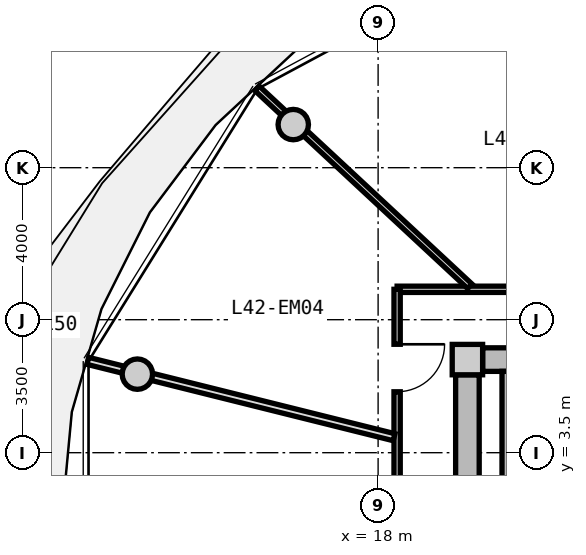
"""IFC4 building model, lengths in metres.
Left out: names, types, materials, properties, quantities, classifications, styles, units other than length and angle.
Written with IfcOpenShell. Run it as: python <this file> out.ifc"""

import sys

from ifc_helpers import new_model, si_unit, direction, frame, frame_2d, origin, origin_2d, place, context, subcontext, project, spatial, rectangle, circle, extrude, source, transform, mapped, element, fill, save


model = new_model("IFC4")
c1 = context("Model", 3, precision=1e-05, world=origin(), true_north=direction((0.0, 1.0)))
c2 = subcontext(c1, "Body", "Model", "MODEL_VIEW")
j1 = project(units=[si_unit("LENGTHUNIT", "METRE"), si_unit("PLANEANGLEUNIT", "RADIAN")], contexts=[c1])
p1 = place(None, origin())
s1 = spatial("IfcSite", under=j1, at=p1, CompositionType="ELEMENT")
p2 = place(p1, origin())
s2 = spatial("IfcBuilding", under=s1, at=p2, CompositionType="ELEMENT")
p3 = place(p2, frame((0.0, 0.0, 137.35)))
s3 = spatial("IfcBuildingStorey", under=s2, at=p3, CompositionType="ELEMENT", Elevation=137.35)
m1 = source(origin(), c2, "Body", "SweptSolid", [
    extrude(rectangle(XDim=0.8, YDim=0.8, at=origin_2d()), origin(), (0.0, 0.0, 1.0), 3.05),
])
p4 = place(p3, frame((20.35, 5.95, 0.0), z_axis=(0.0, 0.0, 1.0), x_axis=(1.0, 0.0, 0.0)))
e1 = element("IfcColumn", 1, at=p4, inside=s3, PredefinedType="COLUMN", context=c2, shape_type="MappedRepresentation", body=[
    mapped(m1, transform((0.0, 0.0, 0.0), x_axis=(1.0, 0.0, 0.0), y_axis=(0.0, 1.0, 0.0), z_axis=(0.0, 0.0, 1.0), scale=1.0)),
])
m2 = source(origin(), c2, "Body", "SweptSolid", [
    extrude(rectangle(XDim=14.5, YDim=0.62, at=frame_2d((7.25, 0.0))), origin(), (0.0, 0.0, 1.0), 2.81),
])
p5 = place(p3, frame((20.75, 5.95, 0.0), z_axis=(0.0, 0.0, 1.0), x_axis=(1.0, 0.0, 0.0)))
e2 = element("IfcWall", 2, at=p5, inside=s3, PredefinedType="SHEAR", context=c2, shape_type="MappedRepresentation", body=[
    mapped(m2, transform((0.0, 0.0, 0.0), x_axis=(1.0, 0.0, 0.0), y_axis=(0.0, 1.0, 0.0), z_axis=(0.0, 0.0, 1.0), scale=1.0)),
])
m3 = source(origin(), c2, "Body", "SweptSolid", [
    extrude(rectangle(XDim=11.1, YDim=0.62, at=frame_2d((5.55, 0.0))), origin(), (0.0, 0.0, 1.0), 2.81),
])
p6 = place(p3, frame((20.35, -5.55, 0.0), z_axis=(0.0, 0.0, 1.0), x_axis=(0.0, 1.0, 0.0)))
e3 = element("IfcWall", 3, at=p6, inside=s3, PredefinedType="SHEAR", context=c2, shape_type="MappedRepresentation", body=[
    mapped(m3, transform((0.0, 0.0, 0.0), x_axis=(1.0, 0.0, 0.0), y_axis=(0.0, 1.0, 0.0), z_axis=(0.0, 0.0, 1.0), scale=1.0)),
])
p7 = place(p6, frame((3.8, 0.0, 0.0)))
e4 = element("IfcOpeningElement", 4, at=p7, cuts=e3, PredefinedType="OPENING", context=c2, shape_type="SweptSolid", body=[
    extrude(rectangle(XDim=1.2, YDim=2.15, at=frame_2d((0.6, 1.075))), frame((0.0, 0.32, 0.0), z_axis=(0.0, -1.0, 0.0), x_axis=(1.0, 0.0, 0.0)), (0.0, 0.0, 1.0), 0.64),
])
m4 = source(origin(), c2, "Body", "SweptSolid", [
    extrude(circle(Radius=0.4, at=origin_2d()), origin(), (0.0, 0.0, 1.0), 3.05),
])
for number, where, z_axis, x_axis in (
    (5, (15.767, 12.135, 0.0), (0.0, 0.0, 1.0), (1.0, 0.0, 0.0)),
    (6, (11.665, 5.567, 0.0), (0.0, 0.0, 1.0), (1.0, 0.0, 0.0)),
):
    element("IfcColumn", number, at=place(p3, frame(where, z_axis=z_axis, x_axis=x_axis)), inside=s3, PredefinedType="COLUMN", context=c2, shape_type="MappedRepresentation", body=[
        mapped(m4, transform((0.0, 0.0, 0.0), x_axis=(1.0, 0.0, 0.0), y_axis=(0.0, 1.0, 0.0), z_axis=(0.0, 0.0, 1.0), scale=1.0)),
    ])
m5 = source(origin(), c2, "Body", "SweptSolid", [
    extrude(rectangle(XDim=3.19, YDim=0.24, at=frame_2d((1.595, 0.0))), origin(), (0.0, 0.0, 1.0), 2.81),
])
p8 = place(p3, frame((21.38, 2.45, 0.0), z_axis=(0.0, 0.0, 1.0), x_axis=(0.0, 1.0, 0.0)))
e7 = element("IfcWall", 7, at=p8, inside=s3, PredefinedType="PARTITIONING", context=c2, shape_type="MappedRepresentation", body=[
    mapped(m5, transform((0.0, 0.0, 0.0), x_axis=(1.0, 0.0, 0.0), y_axis=(0.0, 1.0, 0.0), z_axis=(0.0, 0.0, 1.0), scale=1.0)),
])
m6 = source(origin(), c2, "Body", "SweptSolid", [
    extrude(rectangle(XDim=8.6, YDim=0.165, at=frame_2d((4.3, 0.0))), origin(), (0.0, 0.0, 1.0), 2.795),
])
p9 = place(p3, frame((18.5, 7.8, 0.0), z_axis=(0.0, 0.0, 1.0), x_axis=(1.0, 0.0, 0.0)))
e8 = element("IfcWall", 8, at=p9, inside=s3, PredefinedType="PARTITIONING", context=c2, shape_type="MappedRepresentation", body=[
    mapped(m6, transform((0.0, 0.0, 0.0), x_axis=(1.0, 0.0, 0.0), y_axis=(0.0, 1.0, 0.0), z_axis=(0.0, 0.0, 1.0), scale=1.0)),
])
m7 = source(origin(), c2, "Body", "SweptSolid", [
    extrude(rectangle(XDim=15.6, YDim=0.165, at=frame_2d((7.8, 0.0))), origin(), (0.0, 0.0, 1.0), 2.795),
])
p10 = place(p3, frame((18.5, -7.8, 0.0), z_axis=(0.0, 0.0, 1.0), x_axis=(0.0, 1.0, 0.0)))
e9 = element("IfcWall", 9, at=p10, inside=s3, PredefinedType="PARTITIONING", context=c2, shape_type="MappedRepresentation", body=[
    mapped(m7, transform((0.0, 0.0, 0.0), x_axis=(1.0, 0.0, 0.0), y_axis=(0.0, 1.0, 0.0), z_axis=(0.0, 0.0, 1.0), scale=1.0)),
])
p11 = place(p10, frame((12.903, 0.0, 0.0)))
e10 = element("IfcOpeningElement", 10, at=p11, cuts=e9, PredefinedType="OPENING", context=c2, shape_type="SweptSolid", body=[
    extrude(rectangle(XDim=1.25, YDim=2.2, at=frame_2d((0.625, 1.1))), frame((0.0, 0.093, 0.0), z_axis=(0.0, -1.0, 0.0), x_axis=(1.0, 0.0, 0.0)), (0.0, 0.0, 1.0), 0.185),
])
p12 = place(p10, frame((8.95, 0.0, 0.0)))
e11 = element("IfcOpeningElement", 11, at=p12, cuts=e9, PredefinedType="OPENING", context=c2, shape_type="SweptSolid", body=[
    extrude(rectangle(XDim=1.25, YDim=2.2, at=frame_2d((0.625, 1.1))), frame((0.0, 0.093, 0.0), z_axis=(0.0, -1.0, 0.0), x_axis=(1.0, 0.0, 0.0)), (0.0, 0.0, 1.0), 0.185),
])
m8 = source(origin(), c2, "Body", "SweptSolid", [
    extrude(rectangle(XDim=7.648, YDim=0.165, at=frame_2d((3.824, 0.0))), origin(), (0.0, 0.0, 1.0), 2.345),
])
p13 = place(p3, frame((20.413, 7.88, 0.0), z_axis=(0.0, 0.0, 1.0), x_axis=(-0.732182665826, 0.681108320213, 0.0)))
e12 = element("IfcWall", 12, at=p13, inside=s3, PredefinedType="PARTITIONING", context=c2, shape_type="MappedRepresentation", body=[
    mapped(m8, transform((0.0, 0.0, 0.0), x_axis=(1.0, 0.0, 0.0), y_axis=(0.0, 1.0, 0.0), z_axis=(0.0, 0.0, 1.0), scale=1.0)),
])
m9 = source(origin(), c2, "Body", "SweptSolid", [
    extrude(rectangle(XDim=8.305, YDim=0.19, at=frame_2d((4.153, 0.0))), origin(), (0.0, 0.0, 1.0), 2.345),
])
p14 = place(p3, frame((18.42, 3.908, 0.0), z_axis=(0.0, 0.0, 1.0), x_axis=(-0.970309994378, 0.241864662175, 0.0)))
e13 = element("IfcWall", 13, at=p14, inside=s3, PredefinedType="PARTITIONING", context=c2, shape_type="MappedRepresentation", body=[
    mapped(m9, transform((0.0, 0.0, 0.0), x_axis=(1.0, 0.0, 0.0), y_axis=(0.0, 1.0, 0.0), z_axis=(0.0, 0.0, 1.0), scale=1.0)),
])
m10 = source(origin(), c2, "Body", "SweptSolid", [
    extrude(rectangle(XDim=1.25, YDim=2.2, at=frame_2d((0.625, 1.1))), frame((0.0, 0.025, 0.0), z_axis=(0.0, -1.0, 0.0), x_axis=(1.0, 0.0, 0.0)), (0.0, 0.0, 1.0), 0.05),
])
p15 = place(p11, frame((1.25, 0.0, 0.0), z_axis=(0.0, 0.0, 1.0), x_axis=(-1.0, 0.0, 0.0)))
e14 = element("IfcDoor", 14, at=p15, inside=s3, OperationType="SINGLE_SWING_LEFT", PredefinedType="DOOR", context=c2, shape_type="MappedRepresentation", body=[
    mapped(m10, transform((0.0, 0.0, 0.0), x_axis=(1.0, 0.0, 0.0), y_axis=(0.0, 1.0, 0.0), z_axis=(0.0, 0.0, 1.0), scale=1.0)),
])
fill(e10, e14)
save(model, sys.argv[1])
